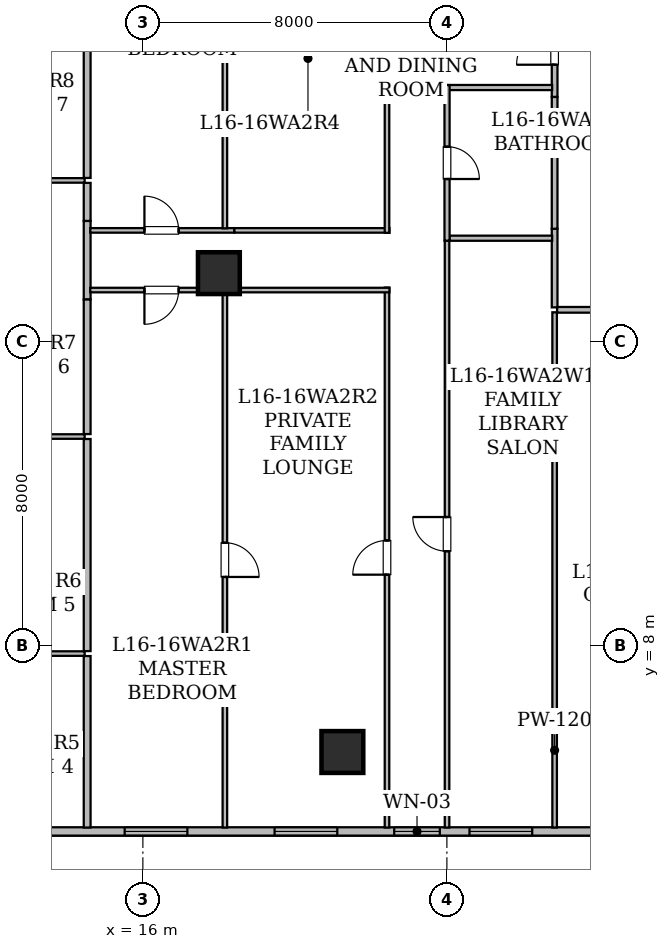
"""IFC4 building model, lengths in metres.
Left out: names, types, materials, properties, quantities, classifications, styles, units other than length and angle.
Written with IfcOpenShell. Run it as: python <this file> out.ifc"""

import sys

from ifc_helpers import new_model, si_unit, direction, frame, frame_2d, origin, origin_2d, place, context, subcontext, project, spatial, rectangle, hollow_rectangle, extrude, element, fill, save


model = new_model("IFC4")
c1 = context("Model", 3, precision=1e-05, world=origin(), true_north=direction((0.0, 1.0)))
c2 = subcontext(c1, "Body", "Model", "MODEL_VIEW")
j1 = project(units=[si_unit("LENGTHUNIT", "METRE"), si_unit("PLANEANGLEUNIT", "RADIAN")], contexts=[c1])
p1 = place(None, origin())
s1 = spatial("IfcSite", under=j1, at=p1, CompositionType="ELEMENT")
p2 = place(p1, origin())
s2 = spatial("IfcBuilding", under=s1, at=p2, CompositionType="ELEMENT")
p3 = place(p2, frame((0.0, 0.0, 66.15)))
s3 = spatial("IfcBuildingStorey", under=s2, at=p3, CompositionType="ELEMENT", Elevation=66.15)
for number, where, z_axis, x_axis in (
    (1, (21.25, 5.2, 0.0), (0.0, 0.0, 1.0), (1.0, 0.0, 0.0)),
    (2, (18.0, 17.8, 0.0), (0.0, 0.0, 1.0), (1.0, 0.0, 0.0)),
):
    element("IfcColumn", number, at=place(p3, frame(where, z_axis=z_axis, x_axis=x_axis)), inside=s3, PredefinedType="COLUMN", context=c2, shape_type="SweptSolid", body=[
        extrude(hollow_rectangle(XDim=1.1, YDim=1.1, WallThickness=0.055, at=origin_2d()), origin(), (0.0, 0.0, 1.0), 3.65),
    ])
p4 = place(p3, frame((45.683, 3.11, 0.0), z_axis=(0.0, 0.0, 1.0), x_axis=(-1.0, 0.0, 0.0)))
e3 = element("IfcWall", 3, at=p4, inside=s3, PredefinedType="STANDARD", context=c2, shape_type="SweptSolid", body=[
    extrude(rectangle(XDim=37.368, YDim=0.22, at=frame_2d((18.684, 0.0))), origin(), (0.0, 0.0, 1.0), 3.43),
])
p5 = place(p4, frame((13.808, 0.0, 0.85)))
e4 = element("IfcOpeningElement", 4, at=p5, cuts=e3, PredefinedType="OPENING", context=c2, shape_type="SweptSolid", body=[
    extrude(rectangle(XDim=1.65, YDim=1.55, at=frame_2d((0.825, 0.775))), frame((0.0, 0.12, 0.0), z_axis=(0.0, -1.0, 0.0), x_axis=(1.0, 0.0, 0.0)), (0.0, 0.0, 1.0), 0.24),
])
p6 = place(p4, frame((32.554, 0.0, 0.85)))
e5 = element("IfcOpeningElement", 5, at=p6, cuts=e3, PredefinedType="OPENING", context=c2, shape_type="SweptSolid", body=[
    extrude(rectangle(XDim=1.65, YDim=1.55, at=frame_2d((0.825, 0.775))), frame((0.0, 0.12, 0.0), z_axis=(0.0, -1.0, 0.0), x_axis=(1.0, 0.0, 0.0)), (0.0, 0.0, 1.0), 0.24),
])
p7 = place(p4, frame((19.438, 0.0, 0.85)))
e6 = element("IfcOpeningElement", 6, at=p7, cuts=e3, PredefinedType="OPENING", context=c2, shape_type="SweptSolid", body=[
    extrude(rectangle(XDim=1.65, YDim=1.55, at=frame_2d((0.825, 0.775))), frame((0.0, 0.12, 0.0), z_axis=(0.0, -1.0, 0.0), x_axis=(1.0, 0.0, 0.0)), (0.0, 0.0, 1.0), 0.24),
])
p8 = place(p4, frame((21.869, 0.0, 0.8)))
e7 = element("IfcOpeningElement", 7, at=p8, cuts=e3, PredefinedType="OPENING", context=c2, shape_type="SweptSolid", body=[
    extrude(rectangle(XDim=1.2, YDim=1.5, at=frame_2d((0.6, 0.75))), frame((0.0, 0.12, 0.0), z_axis=(0.0, -1.0, 0.0), x_axis=(1.0, 0.0, 0.0)), (0.0, 0.0, 1.0), 0.24),
])
p9 = place(p4, frame((28.512, 0.0, 0.85)))
e8 = element("IfcOpeningElement", 8, at=p9, cuts=e3, PredefinedType="OPENING", context=c2, shape_type="SweptSolid", body=[
    extrude(rectangle(XDim=1.65, YDim=1.55, at=frame_2d((0.825, 0.775))), frame((0.0, 0.12, 0.0), z_axis=(0.0, -1.0, 0.0), x_axis=(1.0, 0.0, 0.0)), (0.0, 0.0, 1.0), 0.24),
])
p10 = place(p4, frame((24.567, 0.0, 0.85)))
e9 = element("IfcOpeningElement", 9, at=p10, cuts=e3, PredefinedType="OPENING", context=c2, shape_type="SweptSolid", body=[
    extrude(rectangle(XDim=1.65, YDim=1.55, at=frame_2d((0.825, 0.775))), frame((0.0, 0.12, 0.0), z_axis=(0.0, -1.0, 0.0), x_axis=(1.0, 0.0, 0.0)), (0.0, 0.0, 1.0), 0.24),
])
p11 = place(p4, frame((9.028, 0.0, 0.8)))
e10 = element("IfcOpeningElement", 10, at=p11, cuts=e3, PredefinedType="OPENING", context=c2, shape_type="SweptSolid", body=[
    extrude(rectangle(XDim=1.2, YDim=1.5, at=frame_2d((0.6, 0.75))), frame((0.0, 0.12, 0.0), z_axis=(0.0, -1.0, 0.0), x_axis=(1.0, 0.0, 0.0)), (0.0, 0.0, 1.0), 0.24),
])
p12 = place(p4, frame((5.753, 0.0, 0.85)))
e11 = element("IfcOpeningElement", 11, at=p12, cuts=e3, PredefinedType="OPENING", context=c2, shape_type="SweptSolid", body=[
    extrude(rectangle(XDim=1.65, YDim=1.55, at=frame_2d((0.825, 0.775))), frame((0.0, 0.12, 0.0), z_axis=(0.0, -1.0, 0.0), x_axis=(1.0, 0.0, 0.0)), (0.0, 0.0, 1.0), 0.24),
])
p13 = place(p4, frame((1.738, 0.0, 0.85)))
e12 = element("IfcOpeningElement", 12, at=p13, cuts=e3, PredefinedType="OPENING", context=c2, shape_type="SweptSolid", body=[
    extrude(rectangle(XDim=1.65, YDim=1.55, at=frame_2d((0.825, 0.775))), frame((0.0, 0.12, 0.0), z_axis=(0.0, -1.0, 0.0), x_axis=(1.0, 0.0, 0.0)), (0.0, 0.0, 1.0), 0.24),
])
p14 = place(p3, frame((35.514, 16.835, 0.0), z_axis=(0.0, 0.0, 1.0), x_axis=(-1.0, 0.0, 0.0)))
e13 = element("IfcWall", 13, at=p14, inside=s3, PredefinedType="STANDARD", context=c2, shape_type="SweptSolid", body=[
    extrude(rectangle(XDim=8.614, YDim=0.15, at=frame_2d((4.307, 0.0))), origin(), (0.0, 0.0, 1.0), 2.647),
])
p15 = place(p14, frame((3.753, 0.0, 0.0)))
e14 = element("IfcOpeningElement", 14, at=p15, cuts=e13, PredefinedType="OPENING", context=c2, shape_type="SweptSolid", body=[
    extrude(rectangle(XDim=1.15, YDim=2.2, at=frame_2d((0.575, 1.1))), frame((0.0, 0.085, 0.0), z_axis=(0.0, -1.0, 0.0), x_axis=(1.0, 0.0, 0.0)), (0.0, 0.0, 1.0), 0.17),
])
p16 = place(p3, frame((26.835, 16.9, 0.0), z_axis=(0.0, 0.0, 1.0), x_axis=(0.0, 1.0, 0.0)))
e15 = element("IfcWall", 15, at=p16, inside=s3, PredefinedType="STANDARD", context=c2, shape_type="SweptSolid", body=[
    extrude(rectangle(XDim=2.068, YDim=0.15, at=frame_2d((1.034, 0.0))), origin(), (0.0, 0.0, 1.0), 2.647),
])
p17 = place(p3, frame((26.835, 22.435, 0.0), z_axis=(0.0, 0.0, 1.0), x_axis=(0.0, 1.0, 0.0)))
e16 = element("IfcWall", 16, at=p17, inside=s3, PredefinedType="STANDARD", context=c2, shape_type="SweptSolid", body=[
    extrude(rectangle(XDim=2.698, YDim=0.15, at=frame_2d((1.349, 0.0))), origin(), (0.0, 0.0, 1.0), 3.065),
])
p18 = place(p17, frame((0.849, 0.0, 0.0)))
e17 = element("IfcOpeningElement", 17, at=p18, cuts=e16, PredefinedType="OPENING", context=c2, shape_type="SweptSolid", body=[
    extrude(rectangle(XDim=1.0, YDim=2.15, at=frame_2d((0.5, 1.075))), frame((0.0, 0.085, 0.0), z_axis=(0.0, -1.0, 0.0), x_axis=(1.0, 0.0, 0.0)), (0.0, 0.0, 1.0), 0.17),
])
p19 = place(p3, frame((26.835, 18.968, 0.0), z_axis=(0.0, 0.0, 1.0), x_axis=(0.0, 1.0, 0.0)))
e18 = element("IfcWall", 18, at=p19, inside=s3, PredefinedType="STANDARD", context=c2, shape_type="SweptSolid", body=[
    extrude(rectangle(XDim=3.467, YDim=0.15, at=frame_2d((1.733, 0.0))), origin(), (0.0, 0.0, 1.0), 2.647),
])
p20 = place(p3, frame((26.835, 3.212, 0.0), z_axis=(0.0, 0.0, 1.0), x_axis=(0.0, 1.0, 0.0)))
e19 = element("IfcWall", 19, at=p20, inside=s3, PredefinedType="PARTITIONING", context=c2, shape_type="SweptSolid", body=[
    extrude(rectangle(XDim=13.558, YDim=0.12, at=frame_2d((6.779, 0.0))), origin(), (0.0, 0.0, 1.0), 2.803),
])
p21 = place(p3, frame((10.128, 7.79, 0.0), z_axis=(0.0, 0.0, 1.0), x_axis=(1.0, 0.0, 0.0)))
e20 = element("IfcWall", 20, at=p21, inside=s3, PredefinedType="PARTITIONING", context=c2, shape_type="SweptSolid", body=[
    extrude(rectangle(XDim=4.341, YDim=0.12, at=frame_2d((2.17, 0.0))), origin(), (0.0, 0.0, 1.0), 2.647),
])
p22 = place(p3, frame((14.534, 7.725, 0.0), z_axis=(0.0, 0.0, 1.0), x_axis=(0.0, -1.0, 0.0)))
e21 = element("IfcWall", 21, at=p22, inside=s3, PredefinedType="STANDARD", context=c2, shape_type="SweptSolid", body=[
    extrude(rectangle(XDim=4.513, YDim=0.18, at=frame_2d((2.257, 0.0))), origin(), (0.0, 0.0, 1.0), 2.803),
])
p23 = place(p3, frame((10.128, 13.501, 0.0), z_axis=(0.0, 0.0, 1.0), x_axis=(1.0, 0.0, 0.0)))
e22 = element("IfcWall", 22, at=p23, inside=s3, PredefinedType="PARTITIONING", context=c2, shape_type="SweptSolid", body=[
    extrude(rectangle(XDim=4.341, YDim=0.12, at=frame_2d((2.17, 0.0))), origin(), (0.0, 0.0, 1.0), 3.43),
])
p24 = place(p3, frame((14.534, 13.436, 0.0), z_axis=(0.0, 0.0, 1.0), x_axis=(0.0, -1.0, 0.0)))
e23 = element("IfcWall", 23, at=p24, inside=s3, PredefinedType="STANDARD", context=c2, shape_type="SweptSolid", body=[
    extrude(rectangle(XDim=5.581, YDim=0.18, at=frame_2d((2.791, 0.0))), origin(), (0.0, 0.0, 1.0), 2.647),
])
p25 = place(p3, frame((10.128, 20.24, 0.0), z_axis=(0.0, 0.0, 1.0), x_axis=(1.0, 0.0, 0.0)))
e24 = element("IfcWall", 24, at=p25, inside=s3, PredefinedType="PARTITIONING", context=c2, shape_type="SweptSolid", body=[
    extrude(rectangle(XDim=4.341, YDim=0.12, at=frame_2d((2.17, 0.0))), origin(), (0.0, 0.0, 1.0), 3.43),
])
p26 = place(p3, frame((14.534, 19.174, 0.0), z_axis=(0.0, 0.0, 1.0), x_axis=(0.0, -1.0, 0.0)))
e25 = element("IfcWall", 25, at=p26, inside=s3, PredefinedType="STANDARD", context=c2, shape_type="SweptSolid", body=[
    extrude(rectangle(XDim=2.068, YDim=0.18, at=frame_2d((1.034, 0.0))), origin(), (0.0, 0.0, 1.0), 2.647),
])
p27 = place(p3, frame((14.534, 17.106, 0.0), z_axis=(0.0, 0.0, 1.0), x_axis=(0.0, -1.0, 0.0)))
e26 = element("IfcWall", 26, at=p27, inside=s3, PredefinedType="STANDARD", context=c2, shape_type="SweptSolid", body=[
    extrude(rectangle(XDim=3.54, YDim=0.18, at=frame_2d((1.77, 0.0))), origin(), (0.0, 0.0, 1.0), 3.43),
])
p28 = place(p3, frame((14.534, 20.175, 0.0), z_axis=(0.0, 0.0, 1.0), x_axis=(0.0, -1.0, 0.0)))
e27 = element("IfcWall", 27, at=p28, inside=s3, PredefinedType="STANDARD", context=c2, shape_type="SweptSolid", body=[
    extrude(rectangle(XDim=1.001, YDim=0.18, at=frame_2d((0.5, 0.0))), origin(), (0.0, 0.0, 1.0), 3.43),
])
p29 = place(p3, frame((14.534, 28.01, 0.0), z_axis=(0.0, 0.0, 1.0), x_axis=(0.0, -1.0, 0.0)))
e28 = element("IfcWall", 28, at=p29, inside=s3, PredefinedType="STANDARD", context=c2, shape_type="SweptSolid", body=[
    extrude(rectangle(XDim=7.705, YDim=0.18, at=frame_2d((3.853, 0.0))), origin(), (0.0, 0.0, 1.0), 3.065),
])
p30 = place(p3, frame((24.004, 3.212, 0.0), z_axis=(0.0, 0.0, 1.0), x_axis=(0.0, 1.0, 0.0)))
e29 = element("IfcWall", 29, at=p30, inside=s3, PredefinedType="PARTITIONING", context=c2, shape_type="SweptSolid", body=[
    extrude(rectangle(XDim=15.442, YDim=0.12, at=frame_2d((7.721, 0.0))), origin(), (0.0, 0.0, 1.0), 2.647),
])
p31 = place(p30, frame((7.271, 0.0, 0.0)))
e30 = element("IfcOpeningElement", 30, at=p31, cuts=e29, PredefinedType="OPENING", context=c2, shape_type="SweptSolid", body=[
    extrude(rectangle(XDim=0.9, YDim=2.1, at=frame_2d((0.45, 1.05))), frame((0.0, 0.07, 0.0), z_axis=(0.0, -1.0, 0.0), x_axis=(1.0, 0.0, 0.0)), (0.0, 0.0, 1.0), 0.14),
])
p32 = place(p3, frame((24.069, 18.719, 0.0), z_axis=(0.0, 0.0, 1.0), x_axis=(1.0, 0.0, 0.0)))
e31 = element("IfcWall", 31, at=p32, inside=s3, PredefinedType="PARTITIONING", context=c2, shape_type="SweptSolid", body=[
    extrude(rectangle(XDim=2.701, YDim=0.135, at=frame_2d((1.351, 0.0))), origin(), (0.0, 0.0, 1.0), 2.647),
])
p33 = place(p3, frame((26.77, 22.684, 0.0), z_axis=(0.0, 0.0, 1.0), x_axis=(-1.0, 0.0, 0.0)))
e32 = element("IfcWall", 32, at=p33, inside=s3, PredefinedType="PARTITIONING", context=c2, shape_type="SweptSolid", body=[
    extrude(rectangle(XDim=2.831, YDim=0.135, at=frame_2d((1.416, 0.0))), origin(), (0.0, 0.0, 1.0), 3.43),
])
p34 = place(p3, frame((24.004, 22.749, 0.0), z_axis=(0.0, 0.0, 1.0), x_axis=(0.0, -1.0, 0.0)))
e33 = element("IfcWall", 33, at=p34, inside=s3, PredefinedType="PARTITIONING", context=c2, shape_type="SweptSolid", body=[
    extrude(rectangle(XDim=4.095, YDim=0.135, at=frame_2d((2.047, 0.0))), origin(), (0.0, 0.0, 1.0), 3.43),
])
p35 = place(p34, frame((1.622, 0.0, 0.0)))
e34 = element("IfcOpeningElement", 34, at=p35, cuts=e33, PredefinedType="OPENING", context=c2, shape_type="SweptSolid", body=[
    extrude(rectangle(XDim=0.85, YDim=2.1, at=frame_2d((0.425, 1.05))), frame((0.0, 0.077, 0.0), z_axis=(0.0, -1.0, 0.0), x_axis=(1.0, 0.0, 0.0)), (0.0, 0.0, 1.0), 0.155),
])
p36 = place(p3, frame((18.407, 17.355, 0.0), z_axis=(0.0, 0.0, 1.0), x_axis=(-1.0, 0.0, 0.0)))
e35 = element("IfcWall", 35, at=p36, inside=s3, PredefinedType="PARTITIONING", context=c2, shape_type="SweptSolid", body=[
    extrude(rectangle(XDim=3.791, YDim=0.12, at=frame_2d((1.896, 0.0))), origin(), (0.0, 0.0, 1.0), 2.647),
])
p37 = place(p36, frame((1.466, 0.0, 0.0)))
e36 = element("IfcOpeningElement", 36, at=p37, cuts=e35, PredefinedType="OPENING", context=c2, shape_type="SweptSolid", body=[
    extrude(rectangle(XDim=0.9, YDim=2.1, at=frame_2d((0.45, 1.05))), frame((0.0, 0.07, 0.0), z_axis=(0.0, -1.0, 0.0), x_axis=(1.0, 0.0, 0.0)), (0.0, 0.0, 1.0), 0.14),
])
p38 = place(p3, frame((22.424, 3.212, 0.0), z_axis=(0.0, 0.0, 1.0), x_axis=(0.0, 1.0, 0.0)))
e37 = element("IfcWall", 37, at=p38, inside=s3, PredefinedType="PARTITIONING", context=c2, shape_type="SweptSolid", body=[
    extrude(rectangle(XDim=14.208, YDim=0.12, at=frame_2d((7.104, 0.0))), origin(), (0.0, 0.0, 1.0), 2.803),
])
p39 = place(p38, frame((6.654, 0.0, 0.0)))
e38 = element("IfcOpeningElement", 38, at=p39, cuts=e37, PredefinedType="OPENING", context=c2, shape_type="SweptSolid", body=[
    extrude(rectangle(XDim=0.9, YDim=2.1, at=frame_2d((0.45, 1.05))), frame((0.0, 0.07, 0.0), z_axis=(0.0, -1.0, 0.0), x_axis=(1.0, 0.0, 0.0)), (0.0, 0.0, 1.0), 0.14),
])
p40 = place(p3, frame((22.489, 17.355, 0.0), z_axis=(0.0, 0.0, 1.0), x_axis=(-1.0, 0.0, 0.0)))
e39 = element("IfcWall", 39, at=p40, inside=s3, PredefinedType="PARTITIONING", context=c2, shape_type="SweptSolid", body=[
    extrude(rectangle(XDim=4.082, YDim=0.12, at=frame_2d((2.041, 0.0))), origin(), (0.0, 0.0, 1.0), 3.43),
])
p41 = place(p3, frame((14.616, 18.925, 0.0), z_axis=(0.0, 0.0, 1.0), x_axis=(1.0, 0.0, 0.0)))
e40 = element("IfcWall", 40, at=p41, inside=s3, PredefinedType="PARTITIONING", context=c2, shape_type="SweptSolid", body=[
    extrude(rectangle(XDim=3.791, YDim=0.12, at=frame_2d((1.896, 0.0))), origin(), (0.0, 0.0, 1.0), 2.647),
])
p42 = place(p41, frame((1.425, 0.0, 0.0)))
e41 = element("IfcOpeningElement", 41, at=p42, cuts=e40, PredefinedType="OPENING", context=c2, shape_type="SweptSolid", body=[
    extrude(rectangle(XDim=0.9, YDim=2.1, at=frame_2d((0.45, 1.05))), frame((0.0, 0.07, 0.0), z_axis=(0.0, -1.0, 0.0), x_axis=(1.0, 0.0, 0.0)), (0.0, 0.0, 1.0), 0.14),
])
p43 = place(p3, frame((18.407, 18.925, 0.0), z_axis=(0.0, 0.0, 1.0), x_axis=(1.0, 0.0, 0.0)))
e42 = element("IfcWall", 42, at=p43, inside=s3, PredefinedType="PARTITIONING", context=c2, shape_type="SweptSolid", body=[
    extrude(rectangle(XDim=4.082, YDim=0.12, at=frame_2d((2.041, 0.0))), origin(), (0.0, 0.0, 1.0), 3.43),
])
p44 = place(p3, frame((22.424, 18.86, 0.0), z_axis=(0.0, 0.0, 1.0), x_axis=(0.0, 1.0, 0.0)))
e43 = element("IfcWall", 43, at=p44, inside=s3, PredefinedType="PARTITIONING", context=c2, shape_type="SweptSolid", body=[
    extrude(rectangle(XDim=14.308, YDim=0.12, at=frame_2d((7.154, 0.0))), origin(), (0.0, 0.0, 1.0), 3.065),
])
p45 = place(p44, frame((6.704, 0.0, 0.0)))
e44 = element("IfcOpeningElement", 44, at=p45, cuts=e43, PredefinedType="OPENING", context=c2, shape_type="SweptSolid", body=[
    extrude(rectangle(XDim=0.9, YDim=2.1, at=frame_2d((0.45, 1.05))), frame((0.0, 0.07, 0.0), z_axis=(0.0, -1.0, 0.0), x_axis=(1.0, 0.0, 0.0)), (0.0, 0.0, 1.0), 0.14),
])
p46 = place(p3, frame((18.158, 17.301, 0.0), z_axis=(0.0, 0.0, 1.0), x_axis=(0.0, -1.0, 0.0)))
e45 = element("IfcWall", 45, at=p46, inside=s3, PredefinedType="PARTITIONING", context=c2, shape_type="SweptSolid", body=[
    extrude(rectangle(XDim=14.089, YDim=0.12, at=frame_2d((7.044, 0.0))), origin(), (0.0, 0.0, 1.0), 2.647),
])
p47 = place(p46, frame((6.595, 0.0, 0.0)))
e46 = element("IfcOpeningElement", 46, at=p47, cuts=e45, PredefinedType="OPENING", context=c2, shape_type="SweptSolid", body=[
    extrude(rectangle(XDim=0.9, YDim=2.1, at=frame_2d((0.45, 1.05))), frame((0.0, 0.07, 0.0), z_axis=(0.0, -1.0, 0.0), x_axis=(1.0, 0.0, 0.0)), (0.0, 0.0, 1.0), 0.14),
])
p48 = place(p3, frame((18.158, 33.168, 0.0), z_axis=(0.0, 0.0, 1.0), x_axis=(0.0, -1.0, 0.0)))
e47 = element("IfcWall", 47, at=p48, inside=s3, PredefinedType="PARTITIONING", context=c2, shape_type="SweptSolid", body=[
    extrude(rectangle(XDim=14.189, YDim=0.12, at=frame_2d((7.094, 0.0))), origin(), (0.0, 0.0, 1.0), 2.647),
])
p49 = place(p48, frame((6.644, 0.0, 0.0)))
e48 = element("IfcOpeningElement", 48, at=p49, cuts=e47, PredefinedType="OPENING", context=c2, shape_type="SweptSolid", body=[
    extrude(rectangle(XDim=0.9, YDim=2.1, at=frame_2d((0.45, 1.05))), frame((0.0, 0.07, 0.0), z_axis=(0.0, -1.0, 0.0), x_axis=(1.0, 0.0, 0.0)), (0.0, 0.0, 1.0), 0.14),
])
p50 = place(p7, origin())
e49 = element("IfcWindow", 49, at=p50, inside=s3, PartitioningType="SINGLE_PANEL", PredefinedType="WINDOW", context=c2, shape_type="SweptSolid", body=[
    extrude(rectangle(XDim=1.65, YDim=1.55, at=frame_2d((0.825, 0.775))), frame((0.0, 0.03, 0.0), z_axis=(0.0, -1.0, 0.0), x_axis=(1.0, 0.0, 0.0)), (0.0, 0.0, 1.0), 0.06),
])
fill(e6, e49)
p51 = place(p8, origin())
e50 = element("IfcWindow", 50, at=p51, inside=s3, PartitioningType="SINGLE_PANEL", PredefinedType="WINDOW", context=c2, shape_type="SweptSolid", body=[
    extrude(rectangle(XDim=1.2, YDim=1.5, at=frame_2d((0.6, 0.75))), frame((0.0, 0.03, 0.0), z_axis=(0.0, -1.0, 0.0), x_axis=(1.0, 0.0, 0.0)), (0.0, 0.0, 1.0), 0.06),
])
fill(e7, e50)
p52 = place(p9, origin())
e51 = element("IfcWindow", 51, at=p52, inside=s3, PartitioningType="SINGLE_PANEL", PredefinedType="WINDOW", context=c2, shape_type="SweptSolid", body=[
    extrude(rectangle(XDim=1.65, YDim=1.55, at=frame_2d((0.825, 0.775))), frame((0.0, 0.03, 0.0), z_axis=(0.0, -1.0, 0.0), x_axis=(1.0, 0.0, 0.0)), (0.0, 0.0, 1.0), 0.06),
])
fill(e8, e51)
p53 = place(p10, origin())
e52 = element("IfcWindow", 52, at=p53, inside=s3, PartitioningType="SINGLE_PANEL", PredefinedType="WINDOW", context=c2, shape_type="SweptSolid", body=[
    extrude(rectangle(XDim=1.65, YDim=1.55, at=frame_2d((0.825, 0.775))), frame((0.0, 0.03, 0.0), z_axis=(0.0, -1.0, 0.0), x_axis=(1.0, 0.0, 0.0)), (0.0, 0.0, 1.0), 0.06),
])
fill(e9, e52)
p54 = place(p18, origin())
e53 = element("IfcDoor", 53, at=p54, inside=s3, OperationType="SINGLE_SWING_LEFT", PredefinedType="DOOR", context=c2, shape_type="SweptSolid", body=[
    extrude(rectangle(XDim=1.0, YDim=2.15, at=frame_2d((0.5, 1.075))), frame((0.0, 0.025, 0.0), z_axis=(0.0, -1.0, 0.0), x_axis=(1.0, 0.0, 0.0)), (0.0, 0.0, 1.0), 0.05),
])
fill(e17, e53)
p55 = place(p31, origin())
e54 = element("IfcDoor", 54, at=p55, inside=s3, OperationType="SINGLE_SWING_RIGHT", PredefinedType="DOOR", context=c2, shape_type="SweptSolid", body=[
    extrude(rectangle(XDim=0.9, YDim=2.1, at=frame_2d((0.45, 1.05))), frame((0.0, 0.025, 0.0), z_axis=(0.0, -1.0, 0.0), x_axis=(1.0, 0.0, 0.0)), (0.0, 0.0, 1.0), 0.05),
])
fill(e30, e54)
p56 = place(p35, origin())
e55 = element("IfcDoor", 55, at=p56, inside=s3, OperationType="SINGLE_SWING_RIGHT", PredefinedType="DOOR", context=c2, shape_type="SweptSolid", body=[
    extrude(rectangle(XDim=0.85, YDim=2.1, at=frame_2d((0.425, 1.05))), frame((0.0, 0.025, 0.0), z_axis=(0.0, -1.0, 0.0), x_axis=(1.0, 0.0, 0.0)), (0.0, 0.0, 1.0), 0.05),
])
fill(e34, e55)
p57 = place(p37, origin())
e56 = element("IfcDoor", 56, at=p57, inside=s3, OperationType="SINGLE_SWING_RIGHT", PredefinedType="DOOR", context=c2, shape_type="SweptSolid", body=[
    extrude(rectangle(XDim=0.9, YDim=2.1, at=frame_2d((0.45, 1.05))), frame((0.0, 0.025, 0.0), z_axis=(0.0, -1.0, 0.0), x_axis=(1.0, 0.0, 0.0)), (0.0, 0.0, 1.0), 0.05),
])
fill(e36, e56)
p58 = place(p39, origin())
e57 = element("IfcDoor", 57, at=p58, inside=s3, OperationType="SINGLE_SWING_LEFT", PredefinedType="DOOR", context=c2, shape_type="SweptSolid", body=[
    extrude(rectangle(XDim=0.9, YDim=2.1, at=frame_2d((0.45, 1.05))), frame((0.0, 0.025, 0.0), z_axis=(0.0, -1.0, 0.0), x_axis=(1.0, 0.0, 0.0)), (0.0, 0.0, 1.0), 0.05),
])
fill(e38, e57)
p59 = place(p42, origin())
e58 = element("IfcDoor", 58, at=p59, inside=s3, OperationType="SINGLE_SWING_LEFT", PredefinedType="DOOR", context=c2, shape_type="SweptSolid", body=[
    extrude(rectangle(XDim=0.9, YDim=2.1, at=frame_2d((0.45, 1.05))), frame((0.0, 0.025, 0.0), z_axis=(0.0, -1.0, 0.0), x_axis=(1.0, 0.0, 0.0)), (0.0, 0.0, 1.0), 0.05),
])
fill(e41, e58)
p60 = place(p47, origin())
e59 = element("IfcDoor", 59, at=p60, inside=s3, OperationType="SINGLE_SWING_RIGHT", PredefinedType="DOOR", context=c2, shape_type="SweptSolid", body=[
    extrude(rectangle(XDim=0.9, YDim=2.1, at=frame_2d((0.45, 1.05))), frame((0.0, 0.025, 0.0), z_axis=(0.0, -1.0, 0.0), x_axis=(1.0, 0.0, 0.0)), (0.0, 0.0, 1.0), 0.05),
])
fill(e46, e59)
save(model, sys.argv[1])
